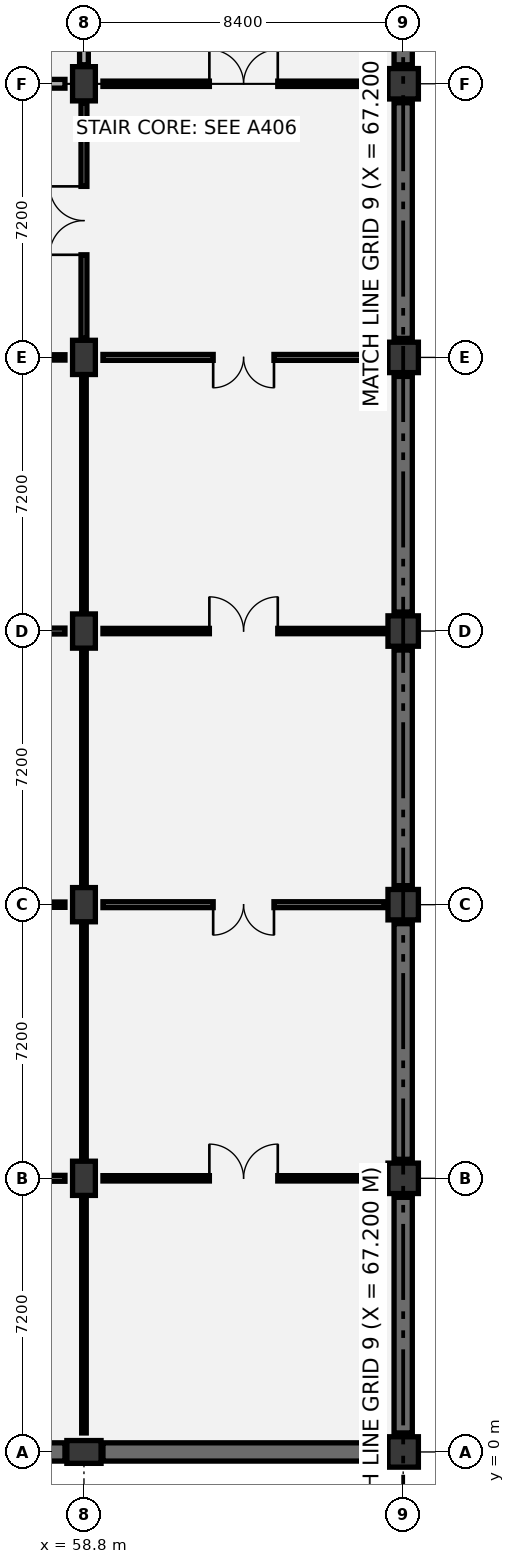
"""IFC4 building model, lengths in metres.
Left out: names, types, materials, properties, quantities, classifications, styles, units other than length and angle.
Written with IfcOpenShell. Run it as: python <this file> out.ifc"""

import sys

from ifc_helpers import new_model, si_unit, direction, frame, frame_2d, origin, origin_2d, place, context, subcontext, project, spatial, rectangle, extrude, element, fill, save


model = new_model("IFC4")
c1 = context("Model", 3, precision=1e-05, world=origin(), true_north=direction((0.0, 1.0)))
c2 = subcontext(c1, "Body", "Model", "MODEL_VIEW")
j1 = project(units=[si_unit("LENGTHUNIT", "METRE"), si_unit("PLANEANGLEUNIT", "RADIAN")], contexts=[c1])
p1 = place(None, origin())
s1 = spatial("IfcSite", under=j1, at=p1, CompositionType="ELEMENT")
p2 = place(p1, origin())
s2 = spatial("IfcBuilding", under=s1, at=p2, CompositionType="ELEMENT")
p3 = place(p2, frame((0.0, 0.0, -4.8)))
s3 = spatial("IfcBuildingStorey", under=s2, at=p3, CompositionType="ELEMENT", Elevation=-4.8)
for number, where, z_axis, x_axis in (
    (1, (58.8, 0.0, 0.0), (0.0, 0.0, 1.0), (0.0, 1.0, 0.0)),
    (2, (58.8, 7.2, 0.0), (0.0, 0.0, 1.0), (1.0, 0.0, 0.0)),
    (3, (58.8, 14.4, 0.0), (0.0, 0.0, 1.0), (1.0, 0.0, 0.0)),
    (4, (58.8, 21.6, 0.0), (0.0, 0.0, 1.0), (1.0, 0.0, 0.0)),
    (5, (58.8, 28.8, 0.0), (0.0, 0.0, 1.0), (1.0, 0.0, 0.0)),
    (6, (58.8, 36.0, 0.0), (0.0, 0.0, 1.0), (1.0, 0.0, 0.0)),
):
    element("IfcColumn", number, at=place(p3, frame(where, z_axis=z_axis, x_axis=x_axis)), inside=s3, PredefinedType="COLUMN", context=c2, shape_type="SweptSolid", body=[
        extrude(rectangle(XDim=0.6, YDim=0.9, at=origin_2d()), origin(), (0.0, 0.0, 1.0), 4.8),
    ])
for number, where, z_axis, x_axis in (
    (7, (67.2, 0.0, 0.0), (0.0, 0.0, 1.0), (1.0, 0.0, 0.0)),
    (8, (67.2, 7.2, 0.0), (0.0, 0.0, 1.0), (1.0, 0.0, 0.0)),
    (9, (67.2, 14.4, 0.0), (0.0, 0.0, 1.0), (1.0, 0.0, 0.0)),
    (10, (67.2, 21.6, 0.0), (0.0, 0.0, 1.0), (1.0, 0.0, 0.0)),
    (11, (67.2, 28.8, 0.0), (0.0, 0.0, 1.0), (1.0, 0.0, 0.0)),
    (12, (67.2, 36.0, 0.0), (0.0, 0.0, 1.0), (1.0, 0.0, 0.0)),
):
    element("IfcColumn", number, at=place(p3, frame(where, z_axis=z_axis, x_axis=x_axis)), inside=s3, PredefinedType="COLUMN", context=c2, shape_type="SweptSolid", body=[
        extrude(rectangle(XDim=0.8, YDim=0.8, at=origin_2d()), origin(), (0.0, 0.0, 1.0), 4.8),
    ])
p4 = place(p3, frame((50.9, 0.0, 0.0), z_axis=(0.0, 0.0, 1.0), x_axis=(1.0, 0.0, 0.0)))
e13 = element("IfcWall", 13, at=p4, inside=s3, PredefinedType="USERDEFINED", context=c2, shape_type="SweptSolid", body=[
    extrude(rectangle(XDim=7.4, YDim=0.48, at=frame_2d((3.7, 0.0))), origin(), (0.0, 0.0, 1.0), 4.45),
])
p5 = place(p3, frame((59.3, 0.0, 0.0), z_axis=(0.0, 0.0, 1.0), x_axis=(1.0, 0.0, 0.0)))
e14 = element("IfcWall", 14, at=p5, inside=s3, PredefinedType="USERDEFINED", context=c2, shape_type="SweptSolid", body=[
    extrude(rectangle(XDim=7.4, YDim=0.48, at=frame_2d((3.7, 0.0))), origin(), (0.0, 0.0, 1.0), 4.45),
])
for number, where, z_axis, x_axis in (
    (15, (67.2, 0.5, 0.0), (0.0, 0.0, 1.0), (0.0, 1.0, 0.0)),
    (16, (67.2, 7.7, 0.0), (0.0, 0.0, 1.0), (0.0, 1.0, 0.0)),
):
    element("IfcWall", number, at=place(p3, frame(where, z_axis=z_axis, x_axis=x_axis)), inside=s3, PredefinedType="USERDEFINED", context=c2, shape_type="SweptSolid", body=[
        extrude(rectangle(XDim=6.2, YDim=0.48, at=frame_2d((3.1, 0.0))), origin(), (0.0, 0.0, 1.0), 4.575),
    ])
p6 = place(p3, frame((67.2, 14.9, 0.0), z_axis=(0.0, 0.0, 1.0), x_axis=(0.0, 1.0, 0.0)))
e17 = element("IfcWall", 17, at=p6, inside=s3, PredefinedType="USERDEFINED", context=c2, shape_type="SweptSolid", body=[
    extrude(rectangle(XDim=6.2, YDim=0.48, at=frame_2d((3.1, 0.0))), origin(), (0.0, 0.0, 1.0), 4.575),
])
for number, where, z_axis, x_axis in (
    (18, (67.2, 22.1, 0.0), (0.0, 0.0, 1.0), (0.0, 1.0, 0.0)),
    (19, (67.2, 29.3, 0.0), (0.0, 0.0, 1.0), (0.0, 1.0, 0.0)),
    (20, (67.2, 36.5, 0.0), (0.0, 0.0, 1.0), (0.0, 1.0, 0.0)),
):
    element("IfcWall", number, at=place(p3, frame(where, z_axis=z_axis, x_axis=x_axis)), inside=s3, PredefinedType="USERDEFINED", context=c2, shape_type="SweptSolid", body=[
        extrude(rectangle(XDim=6.2, YDim=0.48, at=frame_2d((3.1, 0.0))), origin(), (0.0, 0.0, 1.0), 4.575),
    ])
p7 = place(p3, frame((58.8, 0.5, 0.0), z_axis=(0.0, 0.0, 1.0), x_axis=(0.0, 1.0, 0.0)))
e21 = element("IfcWall", 21, at=p7, inside=s3, PredefinedType="PARTITIONING", context=c2, shape_type="SweptSolid", body=[
    extrude(rectangle(XDim=6.2, YDim=0.12, at=frame_2d((3.1, 0.0))), origin(), (0.0, 0.0, 1.0), 3.645),
])
p8 = place(p3, frame((50.9, 7.2, 0.0), z_axis=(0.0, 0.0, 1.0), x_axis=(1.0, 0.0, 0.0)))
e22 = element("IfcWall", 22, at=p8, inside=s3, PredefinedType="PARTITIONING", context=c2, shape_type="SweptSolid", body=[
    extrude(rectangle(XDim=7.4, YDim=0.155, at=frame_2d((3.7, 0.0))), origin(), (0.0, 0.0, 1.0), 3.545),
])
p9 = place(p8, frame((2.8, 0.0, 0.0)))
e23 = element("IfcOpeningElement", 23, at=p9, cuts=e22, PredefinedType="OPENING", context=c2, shape_type="SweptSolid", body=[
    extrude(rectangle(XDim=1.8, YDim=2.25, at=frame_2d((0.9, 1.125))), frame((0.0, 0.087, 0.0), z_axis=(0.0, -1.0, 0.0), x_axis=(1.0, 0.0, 0.0)), (0.0, 0.0, 1.0), 0.175),
])
p10 = place(p3, frame((58.8, 7.7, 0.0), z_axis=(0.0, 0.0, 1.0), x_axis=(0.0, 1.0, 0.0)))
e24 = element("IfcWall", 24, at=p10, inside=s3, PredefinedType="PARTITIONING", context=c2, shape_type="SweptSolid", body=[
    extrude(rectangle(XDim=6.2, YDim=0.12, at=frame_2d((3.1, 0.0))), origin(), (0.0, 0.0, 1.0), 3.645),
])
p11 = place(p3, frame((50.9, 14.4, 0.0), z_axis=(0.0, 0.0, 1.0), x_axis=(1.0, 0.0, 0.0)))
e25 = element("IfcWall", 25, at=p11, inside=s3, PredefinedType="PARTITIONING", context=c2, shape_type="SweptSolid", body=[
    extrude(rectangle(XDim=7.4, YDim=0.14, at=frame_2d((3.7, 0.0))), origin(), (0.0, 0.0, 1.0), 3.545),
])
p12 = place(p11, frame((2.9, 0.0, 0.0)))
e26 = element("IfcOpeningElement", 26, at=p12, cuts=e25, PredefinedType="OPENING", context=c2, shape_type="SweptSolid", body=[
    extrude(rectangle(XDim=1.6, YDim=2.2, at=frame_2d((0.8, 1.1))), frame((0.0, 0.08, 0.0), z_axis=(0.0, -1.0, 0.0), x_axis=(1.0, 0.0, 0.0)), (0.0, 0.0, 1.0), 0.16),
])
p13 = place(p3, frame((58.8, 14.9, 0.0), z_axis=(0.0, 0.0, 1.0), x_axis=(0.0, 1.0, 0.0)))
e27 = element("IfcWall", 27, at=p13, inside=s3, PredefinedType="PARTITIONING", context=c2, shape_type="SweptSolid", body=[
    extrude(rectangle(XDim=6.2, YDim=0.12, at=frame_2d((3.1, 0.0))), origin(), (0.0, 0.0, 1.0), 3.645),
])
p14 = place(p3, frame((50.9, 21.6, 0.0), z_axis=(0.0, 0.0, 1.0), x_axis=(1.0, 0.0, 0.0)))
e28 = element("IfcWall", 28, at=p14, inside=s3, PredefinedType="PARTITIONING", context=c2, shape_type="SweptSolid", body=[
    extrude(rectangle(XDim=7.4, YDim=0.155, at=frame_2d((3.7, 0.0))), origin(), (0.0, 0.0, 1.0), 3.545),
])
p15 = place(p14, frame((2.8, 0.0, 0.0)))
e29 = element("IfcOpeningElement", 29, at=p15, cuts=e28, PredefinedType="OPENING", context=c2, shape_type="SweptSolid", body=[
    extrude(rectangle(XDim=1.8, YDim=2.25, at=frame_2d((0.9, 1.125))), frame((0.0, 0.087, 0.0), z_axis=(0.0, -1.0, 0.0), x_axis=(1.0, 0.0, 0.0)), (0.0, 0.0, 1.0), 0.175),
])
p16 = place(p3, frame((58.8, 22.1, 0.0), z_axis=(0.0, 0.0, 1.0), x_axis=(0.0, 1.0, 0.0)))
e30 = element("IfcWall", 30, at=p16, inside=s3, PredefinedType="PARTITIONING", context=c2, shape_type="SweptSolid", body=[
    extrude(rectangle(XDim=6.2, YDim=0.12, at=frame_2d((3.1, 0.0))), origin(), (0.0, 0.0, 1.0), 3.645),
])
p17 = place(p3, frame((50.9, 28.8, 0.0), z_axis=(0.0, 0.0, 1.0), x_axis=(1.0, 0.0, 0.0)))
e31 = element("IfcWall", 31, at=p17, inside=s3, PredefinedType="PARTITIONING", context=c2, shape_type="SweptSolid", body=[
    extrude(rectangle(XDim=7.4, YDim=0.14, at=frame_2d((3.7, 0.0))), origin(), (0.0, 0.0, 1.0), 3.545),
])
p18 = place(p17, frame((2.9, 0.0, 0.0)))
e32 = element("IfcOpeningElement", 32, at=p18, cuts=e31, PredefinedType="OPENING", context=c2, shape_type="SweptSolid", body=[
    extrude(rectangle(XDim=1.6, YDim=2.2, at=frame_2d((0.8, 1.1))), frame((0.0, 0.08, 0.0), z_axis=(0.0, -1.0, 0.0), x_axis=(1.0, 0.0, 0.0)), (0.0, 0.0, 1.0), 0.16),
])
p19 = place(p3, frame((58.8, 29.3, 0.0), z_axis=(0.0, 0.0, 1.0), x_axis=(0.0, 1.0, 0.0)))
e33 = element("IfcWall", 33, at=p19, inside=s3, PredefinedType="PARTITIONING", context=c2, shape_type="SweptSolid", body=[
    extrude(rectangle(XDim=6.2, YDim=0.155, at=frame_2d((3.1, 0.0))), origin(), (0.0, 0.0, 1.0), 3.645),
])
p20 = place(p19, frame((2.2, 0.0, 0.0)))
e34 = element("IfcOpeningElement", 34, at=p20, cuts=e33, PredefinedType="OPENING", context=c2, shape_type="SweptSolid", body=[
    extrude(rectangle(XDim=1.8, YDim=2.25, at=frame_2d((0.9, 1.125))), frame((0.0, 0.087, 0.0), z_axis=(0.0, -1.0, 0.0), x_axis=(1.0, 0.0, 0.0)), (0.0, 0.0, 1.0), 0.175),
])
p21 = place(p3, frame((50.9, 36.0, 0.0), z_axis=(0.0, 0.0, 1.0), x_axis=(1.0, 0.0, 0.0)))
e35 = element("IfcWall", 35, at=p21, inside=s3, PredefinedType="PARTITIONING", context=c2, shape_type="SweptSolid", body=[
    extrude(rectangle(XDim=7.4, YDim=0.23, at=frame_2d((3.7, 0.0))), origin(), (0.0, 0.0, 1.0), 3.545),
])
p22 = place(p21, frame((2.95, 0.0, 0.0)))
e36 = element("IfcOpeningElement", 36, at=p22, cuts=e35, PredefinedType="OPENING", context=c2, shape_type="SweptSolid", body=[
    extrude(rectangle(XDim=1.5, YDim=2.15, at=frame_2d((0.75, 1.075))), frame((0.0, 0.125, 0.0), z_axis=(0.0, -1.0, 0.0), x_axis=(1.0, 0.0, 0.0)), (0.0, 0.0, 1.0), 0.25),
])
p23 = place(p3, frame((58.8, 36.5, 0.0), z_axis=(0.0, 0.0, 1.0), x_axis=(0.0, 1.0, 0.0)))
e37 = element("IfcWall", 37, at=p23, inside=s3, PredefinedType="PARTITIONING", context=c2, shape_type="SweptSolid", body=[
    extrude(rectangle(XDim=6.2, YDim=0.23, at=frame_2d((3.1, 0.0))), origin(), (0.0, 0.0, 1.0), 3.645),
])
p24 = place(p3, frame((59.3, 7.2, 0.0), z_axis=(0.0, 0.0, 1.0), x_axis=(1.0, 0.0, 0.0)))
e38 = element("IfcWall", 38, at=p24, inside=s3, PredefinedType="PARTITIONING", context=c2, shape_type="SweptSolid", body=[
    extrude(rectangle(XDim=7.4, YDim=0.14, at=frame_2d((3.7, 0.0))), origin(), (0.0, 0.0, 1.0), 3.545),
])
p25 = place(p24, frame((2.8, 0.0, 0.0)))
e39 = element("IfcOpeningElement", 39, at=p25, cuts=e38, PredefinedType="OPENING", context=c2, shape_type="SweptSolid", body=[
    extrude(rectangle(XDim=1.8, YDim=2.25, at=frame_2d((0.9, 1.125))), frame((0.0, 0.08, 0.0), z_axis=(0.0, -1.0, 0.0), x_axis=(1.0, 0.0, 0.0)), (0.0, 0.0, 1.0), 0.16),
])
p26 = place(p3, frame((59.3, 14.4, 0.0), z_axis=(0.0, 0.0, 1.0), x_axis=(1.0, 0.0, 0.0)))
e40 = element("IfcWall", 40, at=p26, inside=s3, PredefinedType="PARTITIONING", context=c2, shape_type="SweptSolid", body=[
    extrude(rectangle(XDim=7.4, YDim=0.155, at=frame_2d((3.7, 0.0))), origin(), (0.0, 0.0, 1.0), 3.545),
])
p27 = place(p26, frame((2.9, 0.0, 0.0)))
e41 = element("IfcOpeningElement", 41, at=p27, cuts=e40, PredefinedType="OPENING", context=c2, shape_type="SweptSolid", body=[
    extrude(rectangle(XDim=1.6, YDim=2.2, at=frame_2d((0.8, 1.1))), frame((0.0, 0.087, 0.0), z_axis=(0.0, -1.0, 0.0), x_axis=(1.0, 0.0, 0.0)), (0.0, 0.0, 1.0), 0.175),
])
p28 = place(p3, frame((59.3, 21.6, 0.0), z_axis=(0.0, 0.0, 1.0), x_axis=(1.0, 0.0, 0.0)))
e42 = element("IfcWall", 42, at=p28, inside=s3, PredefinedType="PARTITIONING", context=c2, shape_type="SweptSolid", body=[
    extrude(rectangle(XDim=7.4, YDim=0.14, at=frame_2d((3.7, 0.0))), origin(), (0.0, 0.0, 1.0), 3.545),
])
p29 = place(p28, frame((2.8, 0.0, 0.0)))
e43 = element("IfcOpeningElement", 43, at=p29, cuts=e42, PredefinedType="OPENING", context=c2, shape_type="SweptSolid", body=[
    extrude(rectangle(XDim=1.8, YDim=2.25, at=frame_2d((0.9, 1.125))), frame((0.0, 0.08, 0.0), z_axis=(0.0, -1.0, 0.0), x_axis=(1.0, 0.0, 0.0)), (0.0, 0.0, 1.0), 0.16),
])
p30 = place(p3, frame((59.3, 28.8, 0.0), z_axis=(0.0, 0.0, 1.0), x_axis=(1.0, 0.0, 0.0)))
e44 = element("IfcWall", 44, at=p30, inside=s3, PredefinedType="PARTITIONING", context=c2, shape_type="SweptSolid", body=[
    extrude(rectangle(XDim=7.4, YDim=0.155, at=frame_2d((3.7, 0.0))), origin(), (0.0, 0.0, 1.0), 3.545),
])
p31 = place(p30, frame((2.9, 0.0, 0.0)))
e45 = element("IfcOpeningElement", 45, at=p31, cuts=e44, PredefinedType="OPENING", context=c2, shape_type="SweptSolid", body=[
    extrude(rectangle(XDim=1.6, YDim=2.2, at=frame_2d((0.8, 1.1))), frame((0.0, 0.087, 0.0), z_axis=(0.0, -1.0, 0.0), x_axis=(1.0, 0.0, 0.0)), (0.0, 0.0, 1.0), 0.175),
])
p32 = place(p3, frame((59.3, 36.0, 0.0), z_axis=(0.0, 0.0, 1.0), x_axis=(1.0, 0.0, 0.0)))
e46 = element("IfcWall", 46, at=p32, inside=s3, PredefinedType="PARTITIONING", context=c2, shape_type="SweptSolid", body=[
    extrude(rectangle(XDim=7.4, YDim=0.14, at=frame_2d((3.7, 0.0))), origin(), (0.0, 0.0, 1.0), 3.545),
])
p33 = place(p32, frame((2.8, 0.0, 0.0)))
e47 = element("IfcOpeningElement", 47, at=p33, cuts=e46, PredefinedType="OPENING", context=c2, shape_type="SweptSolid", body=[
    extrude(rectangle(XDim=1.8, YDim=2.25, at=frame_2d((0.9, 1.125))), frame((0.0, 0.08, 0.0), z_axis=(0.0, -1.0, 0.0), x_axis=(1.0, 0.0, 0.0)), (0.0, 0.0, 1.0), 0.16),
])
p34 = place(p20, origin())
e48 = element("IfcDoor", 48, at=p34, inside=s3, OperationType="DOUBLE_DOOR_SINGLE_SWING", PredefinedType="DOOR", context=c2, shape_type="SweptSolid", body=[
    extrude(rectangle(XDim=1.8, YDim=2.25, at=frame_2d((0.9, 1.125))), frame((0.0, 0.025, 0.0), z_axis=(0.0, -1.0, 0.0), x_axis=(1.0, 0.0, 0.0)), (0.0, 0.0, 1.0), 0.05),
])
fill(e34, e48)
p35 = place(p25, origin())
e49 = element("IfcDoor", 49, at=p35, inside=s3, OperationType="DOUBLE_DOOR_SINGLE_SWING", PredefinedType="DOOR", context=c2, shape_type="SweptSolid", body=[
    extrude(rectangle(XDim=1.8, YDim=2.25, at=frame_2d((0.9, 1.125))), frame((0.0, 0.025, 0.0), z_axis=(0.0, -1.0, 0.0), x_axis=(1.0, 0.0, 0.0)), (0.0, 0.0, 1.0), 0.05),
])
fill(e39, e49)
p36 = place(p27, frame((1.6, 0.0, 0.0), z_axis=(0.0, 0.0, 1.0), x_axis=(-1.0, 0.0, 0.0)))
e50 = element("IfcDoor", 50, at=p36, inside=s3, OperationType="DOUBLE_DOOR_SINGLE_SWING", PredefinedType="DOOR", context=c2, shape_type="SweptSolid", body=[
    extrude(rectangle(XDim=1.6, YDim=2.2, at=frame_2d((0.8, 1.1))), frame((0.0, 0.025, 0.0), z_axis=(0.0, -1.0, 0.0), x_axis=(1.0, 0.0, 0.0)), (0.0, 0.0, 1.0), 0.05),
])
fill(e41, e50)
p37 = place(p29, origin())
e51 = element("IfcDoor", 51, at=p37, inside=s3, OperationType="DOUBLE_DOOR_SINGLE_SWING", PredefinedType="DOOR", context=c2, shape_type="SweptSolid", body=[
    extrude(rectangle(XDim=1.8, YDim=2.25, at=frame_2d((0.9, 1.125))), frame((0.0, 0.025, 0.0), z_axis=(0.0, -1.0, 0.0), x_axis=(1.0, 0.0, 0.0)), (0.0, 0.0, 1.0), 0.05),
])
fill(e43, e51)
p38 = place(p31, frame((1.6, 0.0, 0.0), z_axis=(0.0, 0.0, 1.0), x_axis=(-1.0, 0.0, 0.0)))
e52 = element("IfcDoor", 52, at=p38, inside=s3, OperationType="DOUBLE_DOOR_SINGLE_SWING", PredefinedType="DOOR", context=c2, shape_type="SweptSolid", body=[
    extrude(rectangle(XDim=1.6, YDim=2.2, at=frame_2d((0.8, 1.1))), frame((0.0, 0.025, 0.0), z_axis=(0.0, -1.0, 0.0), x_axis=(1.0, 0.0, 0.0)), (0.0, 0.0, 1.0), 0.05),
])
fill(e45, e52)
p39 = place(p33, origin())
e53 = element("IfcDoor", 53, at=p39, inside=s3, OperationType="DOUBLE_DOOR_SINGLE_SWING", PredefinedType="DOOR", context=c2, shape_type="SweptSolid", body=[
    extrude(rectangle(XDim=1.8, YDim=2.25, at=frame_2d((0.9, 1.125))), frame((0.0, 0.025, 0.0), z_axis=(0.0, -1.0, 0.0), x_axis=(1.0, 0.0, 0.0)), (0.0, 0.0, 1.0), 0.05),
])
fill(e47, e53)
save(model, sys.argv[1])
